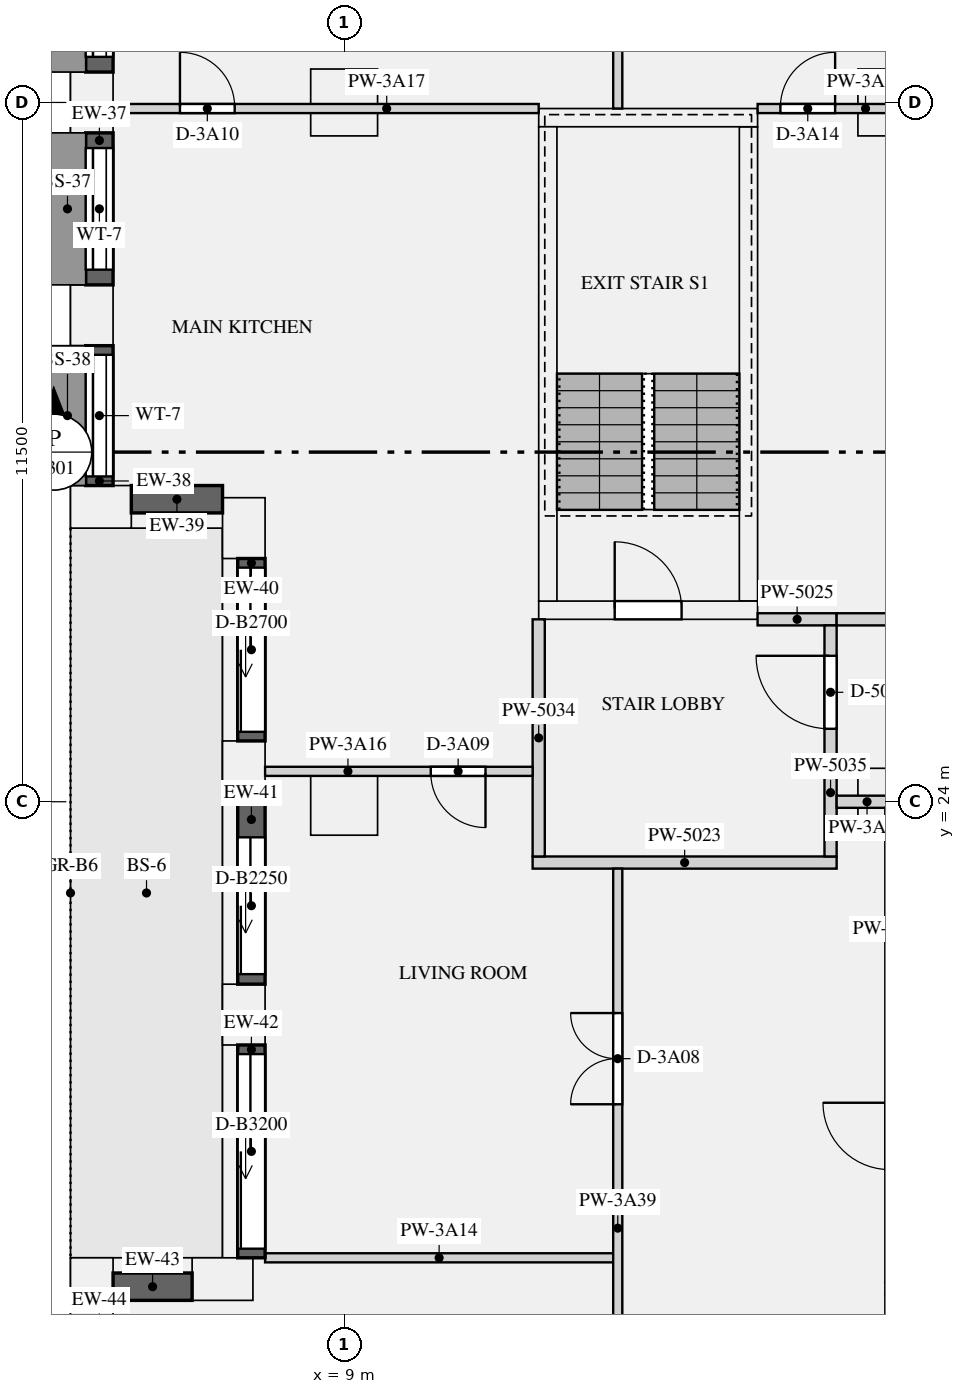
"""IFC4 building model, lengths in metres.
Left out: names, types, materials, properties, quantities, classifications, styles, units other than length and angle.
Written with IfcOpenShell. Run it as: python <this file> out.ifc"""

import sys

from ifc_helpers import new_model, si_unit, direction, frame, frame_2d, origin, origin_2d, place, context, subcontext, project, spatial, rectangle, extrude, element, fill, save


model = new_model("IFC4")
c1 = context("Model", 3, precision=1e-05, world=origin(), true_north=direction((0.0, 1.0)))
c2 = subcontext(c1, "Body", "Model", "MODEL_VIEW")
j1 = project(units=[si_unit("LENGTHUNIT", "METRE"), si_unit("PLANEANGLEUNIT", "RADIAN")], contexts=[c1])
p1 = place(None, origin())
s1 = spatial("IfcSite", under=j1, at=p1, CompositionType="ELEMENT")
p2 = place(p1, origin())
s2 = spatial("IfcBuilding", under=s1, at=p2, CompositionType="ELEMENT")
p3 = place(p2, frame((0.0, 0.0, 144.45)))
s3 = spatial("IfcBuildingStorey", under=s2, at=p3, CompositionType="ELEMENT", Elevation=144.45)
for number, where, z_axis, x_axis in (
    (1, (4.85, 35.5, 0.0), (0.0, 0.0, 1.0), (0.0, -1.0, 0.0)),
    (2, (4.85, 32.0, 0.0), (0.0, 0.0, 1.0), (0.0, -1.0, 0.0)),
    (3, (5.0, 28.85, 0.0), (0.0, 0.0, 1.0), (1.0, 0.0, 0.0)),
    (4, (7.35, 28.5, 0.0), (0.0, 0.0, 1.0), (0.0, -1.0, 0.0)),
    (5, (7.35, 24.5, 0.0), (0.0, 0.0, 1.0), (0.0, -1.0, 0.0)),
    (6, (7.35, 20.5, 0.0), (0.0, 0.0, 1.0), (0.0, -1.0, 0.0)),
    (7, (7.0, 16.15, 0.0), (0.0, 0.0, 1.0), (-1.0, 0.0, 0.0)),
    (8, (4.85, 16.0, 0.0), (0.0, 0.0, 1.0), (0.0, -1.0, 0.0)),
):
    element("IfcColumn", number, at=place(p3, frame(where, z_axis=z_axis, x_axis=x_axis)), inside=s3, PredefinedType="USERDEFINED", context=c2, shape_type="SweptSolid", body=[
        extrude(rectangle(XDim=1.0, YDim=0.7, at=origin_2d()), origin(), (0.0, 0.0, 1.0), 3.15),
    ])
for number, where, z_axis, x_axis in (
    (9, (9.0, 24.0, 0.0), (0.0, 0.0, 1.0), (1.0, 0.0, 0.0)),
    (10, (18.0, 24.0, 0.0), (0.0, 0.0, 1.0), (1.0, 0.0, 0.0)),
    (11, (9.0, 35.5, 0.0), (0.0, 0.0, 1.0), (1.0, 0.0, 0.0)),
    (12, (18.0, 35.5, 0.0), (0.0, 0.0, 1.0), (1.0, 0.0, 0.0)),
):
    element("IfcColumn", number, at=place(p3, frame(where, z_axis=z_axis, x_axis=x_axis)), inside=s3, PredefinedType="COLUMN", context=c2, shape_type="SweptSolid", body=[
        extrude(rectangle(XDim=1.1, YDim=1.1, at=origin_2d()), origin(), (0.0, 0.0, 1.0), 3.15),
    ])
p4 = place(p3, frame((12.2, 27.15, 0.0), z_axis=(0.0, 0.0, 1.0), x_axis=(1.0, 0.0, 0.0)))
e13 = element("IfcWall", 13, at=p4, inside=s3, PredefinedType="SHEAR", context=c2, shape_type="SweptSolid", body=[
    extrude(rectangle(XDim=3.6, YDim=0.3, at=frame_2d((1.8, 0.0))), origin(), (0.0, 0.0, 1.0), 3.15),
])
p5 = place(p4, frame((1.25, 0.0, 0.0)))
e14 = element("IfcOpeningElement", 14, at=p5, cuts=e13, PredefinedType="OPENING", context=c2, shape_type="SweptSolid", body=[
    extrude(rectangle(XDim=1.1, YDim=2.1, at=frame_2d((0.55, 1.05))), frame((0.0, 0.16, 0.0), z_axis=(0.0, -1.0, 0.0), x_axis=(1.0, 0.0, 0.0)), (0.0, 0.0, 1.0), 0.32),
])
p6 = place(p3, frame((12.2, 35.25, 0.0), z_axis=(0.0, 0.0, 1.0), x_axis=(1.0, 0.0, 0.0)))
e15 = element("IfcWall", 15, at=p6, inside=s3, PredefinedType="SHEAR", context=c2, shape_type="SweptSolid", body=[
    extrude(rectangle(XDim=3.6, YDim=0.3, at=frame_2d((1.8, 0.0))), origin(), (0.0, 0.0, 1.0), 3.15),
])
for number, where, z_axis, x_axis in (
    (16, (12.35, 27.3, 0.0), (0.0, 0.0, 1.0), (0.0, 1.0, 0.0)),
    (17, (15.65, 27.3, 0.0), (0.0, 0.0, 1.0), (0.0, 1.0, 0.0)),
):
    element("IfcWall", number, at=place(p3, frame(where, z_axis=z_axis, x_axis=x_axis)), inside=s3, PredefinedType="SHEAR", context=c2, shape_type="SweptSolid", body=[
        extrude(rectangle(XDim=7.8, YDim=0.3, at=frame_2d((3.9, 0.0))), origin(), (0.0, 0.0, 1.0), 3.15),
    ])
p7 = place(p3, frame((4.975, 38.0, 0.9), z_axis=(0.0, 0.0, 1.0), x_axis=(0.0, -1.0, 0.0)))
e18 = element("IfcWall", 18, at=p7, inside=s3, PredefinedType="SOLIDWALL", context=c2, shape_type="SweptSolid", body=[
    extrude(rectangle(XDim=2.0, YDim=0.45, at=frame_2d((1.0, 0.0))), origin(), (0.0, 0.0, 1.0), 1.93),
])
p8 = place(p7, frame((0.25, 0.0, 0.15)))
e19 = element("IfcOpeningElement", 19, at=p8, cuts=e18, PredefinedType="OPENING", context=c2, shape_type="SweptSolid", body=[
    extrude(rectangle(XDim=1.5, YDim=1.5, at=frame_2d((0.75, 0.75))), frame((0.0, 0.235, 0.0), z_axis=(0.0, -1.0, 0.0), x_axis=(1.0, 0.0, 0.0)), (0.0, 0.0, 1.0), 0.47),
])
p9 = place(p3, frame((4.975, 35.0, 0.9), z_axis=(0.0, 0.0, 1.0), x_axis=(0.0, -1.0, 0.0)))
e20 = element("IfcWall", 20, at=p9, inside=s3, PredefinedType="SOLIDWALL", context=c2, shape_type="SweptSolid", body=[
    extrude(rectangle(XDim=2.5, YDim=0.45, at=frame_2d((1.25, 0.0))), origin(), (0.0, 0.0, 1.0), 1.93),
])
p10 = place(p9, frame((0.25, 0.0, 0.15)))
e21 = element("IfcOpeningElement", 21, at=p10, cuts=e20, PredefinedType="OPENING", context=c2, shape_type="SweptSolid", body=[
    extrude(rectangle(XDim=2.0, YDim=1.5, at=frame_2d((1.0, 0.75))), frame((0.0, 0.235, 0.0), z_axis=(0.0, -1.0, 0.0), x_axis=(1.0, 0.0, 0.0)), (0.0, 0.0, 1.0), 0.47),
])
p11 = place(p3, frame((4.975, 31.5, 0.9), z_axis=(0.0, 0.0, 1.0), x_axis=(0.0, -1.0, 0.0)))
e22 = element("IfcWall", 22, at=p11, inside=s3, PredefinedType="SOLIDWALL", context=c2, shape_type="SweptSolid", body=[
    extrude(rectangle(XDim=2.3, YDim=0.45, at=frame_2d((1.15, 0.0))), origin(), (0.0, 0.0, 1.0), 1.93),
])
p12 = place(p11, frame((0.15, 0.0, 0.15)))
e23 = element("IfcOpeningElement", 23, at=p12, cuts=e22, PredefinedType="OPENING", context=c2, shape_type="SweptSolid", body=[
    extrude(rectangle(XDim=2.0, YDim=1.5, at=frame_2d((1.0, 0.75))), frame((0.0, 0.235, 0.0), z_axis=(0.0, -1.0, 0.0), x_axis=(1.0, 0.0, 0.0)), (0.0, 0.0, 1.0), 0.47),
])
p13 = place(p3, frame((5.5, 28.975, 0.9), z_axis=(0.0, 0.0, 1.0), x_axis=(1.0, 0.0, 0.0)))
e24 = element("IfcWall", 24, at=p13, inside=s3, PredefinedType="SOLIDWALL", context=c2, shape_type="SweptSolid", body=[
    extrude(rectangle(XDim=1.5, YDim=0.45, at=frame_2d((0.75, 0.0))), origin(), (0.0, 0.0, 1.0), 1.93),
])
p14 = place(p3, frame((7.475, 28.0, 0.0), z_axis=(0.0, 0.0, 1.0), x_axis=(0.0, -1.0, 0.0)))
e25 = element("IfcWall", 25, at=p14, inside=s3, PredefinedType="SOLIDWALL", context=c2, shape_type="SweptSolid", body=[
    extrude(rectangle(XDim=3.0, YDim=0.45, at=frame_2d((1.5, 0.0))), origin(), (0.0, 0.0, 1.0), 2.83),
])
p15 = place(p14, frame((0.15, 0.0, 0.0)))
e26 = element("IfcOpeningElement", 26, at=p15, cuts=e25, PredefinedType="OPENING", context=c2, shape_type="SweptSolid", body=[
    extrude(rectangle(XDim=2.7, YDim=2.3, at=frame_2d((1.35, 1.15))), frame((0.0, 0.235, 0.0), z_axis=(0.0, -1.0, 0.0), x_axis=(1.0, 0.0, 0.0)), (0.0, 0.0, 1.0), 0.47),
])
p16 = place(p3, frame((7.475, 24.0, 0.0), z_axis=(0.0, 0.0, 1.0), x_axis=(0.0, -1.0, 0.0)))
e27 = element("IfcWall", 27, at=p16, inside=s3, PredefinedType="SOLIDWALL", context=c2, shape_type="SweptSolid", body=[
    extrude(rectangle(XDim=3.0, YDim=0.45, at=frame_2d((1.5, 0.0))), origin(), (0.0, 0.0, 1.0), 2.83),
])
p17 = place(p16, frame((0.585, 0.0, 0.0)))
e28 = element("IfcOpeningElement", 28, at=p17, cuts=e27, PredefinedType="OPENING", context=c2, shape_type="SweptSolid", body=[
    extrude(rectangle(XDim=2.25, YDim=2.3, at=frame_2d((1.125, 1.15))), frame((0.0, 0.235, 0.0), z_axis=(0.0, -1.0, 0.0), x_axis=(1.0, 0.0, 0.0)), (0.0, 0.0, 1.0), 0.47),
])
p18 = place(p3, frame((7.475, 20.0, 0.0), z_axis=(0.0, 0.0, 1.0), x_axis=(0.0, -1.0, 0.0)))
e29 = element("IfcWall", 29, at=p18, inside=s3, PredefinedType="SOLIDWALL", context=c2, shape_type="SweptSolid", body=[
    extrude(rectangle(XDim=3.5, YDim=0.45, at=frame_2d((1.75, 0.0))), origin(), (0.0, 0.0, 1.0), 2.83),
])
p19 = place(p18, frame((0.15, 0.0, 0.0)))
e30 = element("IfcOpeningElement", 30, at=p19, cuts=e29, PredefinedType="OPENING", context=c2, shape_type="SweptSolid", body=[
    extrude(rectangle(XDim=3.2, YDim=2.3, at=frame_2d((1.6, 1.15))), frame((0.0, 0.235, 0.0), z_axis=(0.0, -1.0, 0.0), x_axis=(1.0, 0.0, 0.0)), (0.0, 0.0, 1.0), 0.47),
])
p20 = place(p3, frame((6.5, 16.025, 0.9), z_axis=(0.0, 0.0, 1.0), x_axis=(-1.0, 0.0, 0.0)))
e31 = element("IfcWall", 31, at=p20, inside=s3, PredefinedType="SOLIDWALL", context=c2, shape_type="SweptSolid", body=[
    extrude(rectangle(XDim=1.3, YDim=0.45, at=frame_2d((0.65, 0.0))), origin(), (0.0, 0.0, 1.0), 1.93),
])
p21 = place(p3, frame((12.1, 23.0, 0.0), z_axis=(0.0, 0.0, 1.0), x_axis=(1.0, 0.0, 0.0)))
e32 = element("IfcWall", 32, at=p21, inside=s3, PredefinedType="PARTITIONING", context=c2, shape_type="SweptSolid", body=[
    extrude(rectangle(XDim=5.0, YDim=0.2, at=frame_2d((2.5, 0.0))), origin(), (0.0, 0.0, 1.0), 2.83),
])
p22 = place(p3, frame((15.8, 27.0, 0.0), z_axis=(0.0, 0.0, 1.0), x_axis=(1.0, 0.0, 0.0)))
e33 = element("IfcWall", 33, at=p22, inside=s3, PredefinedType="PARTITIONING", context=c2, shape_type="SweptSolid", body=[
    extrude(rectangle(XDim=1.3, YDim=0.2, at=frame_2d((0.65, 0.0))), origin(), (0.0, 0.0, 1.0), 2.83),
])
p23 = place(p3, frame((12.2, 23.1, 0.0), z_axis=(0.0, 0.0, 1.0), x_axis=(0.0, 1.0, 0.0)))
e34 = element("IfcWall", 34, at=p23, inside=s3, PredefinedType="PARTITIONING", context=c2, shape_type="SweptSolid", body=[
    extrude(rectangle(XDim=3.9, YDim=0.2, at=frame_2d((1.95, 0.0))), origin(), (0.0, 0.0, 1.0), 2.83),
])
p24 = place(p3, frame((17.0, 23.1, 0.0), z_axis=(0.0, 0.0, 1.0), x_axis=(0.0, 1.0, 0.0)))
e35 = element("IfcWall", 35, at=p24, inside=s3, PredefinedType="PARTITIONING", context=c2, shape_type="SweptSolid", body=[
    extrude(rectangle(XDim=3.8, YDim=0.2, at=frame_2d((1.9, 0.0))), origin(), (0.0, 0.0, 1.0), 2.83),
])
p25 = place(p24, frame((2.1, 0.0, 0.0)))
e36 = element("IfcOpeningElement", 36, at=p25, cuts=e35, PredefinedType="OPENING", context=c2, shape_type="SweptSolid", body=[
    extrude(rectangle(XDim=1.2, YDim=2.1, at=frame_2d((0.6, 1.05))), frame((0.0, 0.11, 0.0), z_axis=(0.0, -1.0, 0.0), x_axis=(1.0, 0.0, 0.0)), (0.0, 0.0, 1.0), 0.22),
])
p26 = place(p3, frame((17.1, 24.0, 0.0), z_axis=(0.0, 0.0, 1.0), x_axis=(1.0, 0.0, 0.0)))
e37 = element("IfcWall", 37, at=p26, inside=s3, PredefinedType="PARTITIONING", context=c2, shape_type="SweptSolid", body=[
    extrude(rectangle(XDim=1.0, YDim=0.2, at=frame_2d((0.5, 0.0))), origin(), (0.0, 0.0, 1.0), 2.83),
])
p27 = place(p3, frame((17.1, 27.0, 0.0), z_axis=(0.0, 0.0, 1.0), x_axis=(1.0, 0.0, 0.0)))
e38 = element("IfcWall", 38, at=p27, inside=s3, PredefinedType="PARTITIONING", context=c2, shape_type="SweptSolid", body=[
    extrude(rectangle(XDim=7.0, YDim=0.2, at=frame_2d((3.5, 0.0))), origin(), (0.0, 0.0, 1.0), 2.83),
])
p28 = place(p3, frame((7.7, 16.5, 0.0), z_axis=(0.0, 0.0, 1.0), x_axis=(1.0, 0.0, 0.0)))
e39 = element("IfcWall", 39, at=p28, inside=s3, PredefinedType="PARTITIONING", context=c2, shape_type="SweptSolid", body=[
    extrude(rectangle(XDim=5.725, YDim=0.15, at=frame_2d((2.863, 0.0))), origin(), (0.0, 0.0, 1.0), 2.83),
])
p29 = place(p3, frame((7.7, 24.5, 0.0), z_axis=(0.0, 0.0, 1.0), x_axis=(1.0, 0.0, 0.0)))
e40 = element("IfcWall", 40, at=p29, inside=s3, PredefinedType="PARTITIONING", context=c2, shape_type="SweptSolid", body=[
    extrude(rectangle(XDim=4.4, YDim=0.15, at=frame_2d((2.2, 0.0))), origin(), (0.0, 0.0, 1.0), 2.83),
])
p30 = place(p29, frame((2.725, 0.0, 0.0)))
e41 = element("IfcOpeningElement", 41, at=p30, cuts=e40, PredefinedType="OPENING", context=c2, shape_type="SweptSolid", body=[
    extrude(rectangle(XDim=0.9, YDim=2.1, at=frame_2d((0.45, 1.05))), frame((0.0, 0.085, 0.0), z_axis=(0.0, -1.0, 0.0), x_axis=(1.0, 0.0, 0.0)), (0.0, 0.0, 1.0), 0.17),
])
p31 = place(p3, frame((5.2, 35.4, 0.0), z_axis=(0.0, 0.0, 1.0), x_axis=(1.0, 0.0, 0.0)))
e42 = element("IfcWall", 42, at=p31, inside=s3, PredefinedType="PARTITIONING", context=c2, shape_type="SweptSolid", body=[
    extrude(rectangle(XDim=7.0, YDim=0.15, at=frame_2d((3.5, 0.0))), origin(), (0.0, 0.0, 1.0), 2.83),
])
p32 = place(p31, frame((1.1, 0.0, 0.0)))
e43 = element("IfcOpeningElement", 43, at=p32, cuts=e42, PredefinedType="OPENING", context=c2, shape_type="SweptSolid", body=[
    extrude(rectangle(XDim=0.9, YDim=2.1, at=frame_2d((0.45, 1.05))), frame((0.0, 0.085, 0.0), z_axis=(0.0, -1.0, 0.0), x_axis=(1.0, 0.0, 0.0)), (0.0, 0.0, 1.0), 0.17),
])
p33 = place(p3, frame((15.8, 35.4, 0.0), z_axis=(0.0, 0.0, 1.0), x_axis=(1.0, 0.0, 0.0)))
e44 = element("IfcWall", 44, at=p33, inside=s3, PredefinedType="PARTITIONING", context=c2, shape_type="SweptSolid", body=[
    extrude(rectangle(XDim=2.275, YDim=0.15, at=frame_2d((1.137, 0.0))), origin(), (0.0, 0.0, 1.0), 2.83),
])
p34 = place(p33, frame((0.375, 0.0, 0.0)))
e45 = element("IfcOpeningElement", 45, at=p34, cuts=e44, PredefinedType="OPENING", context=c2, shape_type="SweptSolid", body=[
    extrude(rectangle(XDim=0.9, YDim=2.1, at=frame_2d((0.45, 1.05))), frame((0.0, 0.085, 0.0), z_axis=(0.0, -1.0, 0.0), x_axis=(1.0, 0.0, 0.0)), (0.0, 0.0, 1.0), 0.17),
])
p35 = place(p3, frame((13.5, 10.575, 0.0), z_axis=(0.0, 0.0, 1.0), x_axis=(0.0, 1.0, 0.0)))
e46 = element("IfcWall", 46, at=p35, inside=s3, PredefinedType="PARTITIONING", context=c2, shape_type="SweptSolid", body=[
    extrude(rectangle(XDim=12.325, YDim=0.15, at=frame_2d((6.163, 0.0))), origin(), (0.0, 0.0, 1.0), 2.83),
])
p36 = place(p35, frame((3.475, 0.0, 0.0)))
e47 = element("IfcOpeningElement", 47, at=p36, cuts=e46, PredefinedType="OPENING", context=c2, shape_type="SweptSolid", body=[
    extrude(rectangle(XDim=0.9, YDim=2.1, at=frame_2d((0.45, 1.05))), frame((0.0, 0.085, 0.0), z_axis=(0.0, -1.0, 0.0), x_axis=(1.0, 0.0, 0.0)), (0.0, 0.0, 1.0), 0.17),
])
p37 = place(p35, frame((8.45, 0.0, 0.0)))
e48 = element("IfcOpeningElement", 48, at=p37, cuts=e46, PredefinedType="OPENING", context=c2, shape_type="SweptSolid", body=[
    extrude(rectangle(XDim=1.5, YDim=2.1, at=frame_2d((0.75, 1.05))), frame((0.0, 0.085, 0.0), z_axis=(0.0, -1.0, 0.0), x_axis=(1.0, 0.0, 0.0)), (0.0, 0.0, 1.0), 0.17),
])
p38 = place(p3, frame((13.5, 35.4, 0.0), z_axis=(0.0, 0.0, 1.0), x_axis=(0.0, 1.0, 0.0)))
e49 = element("IfcWall", 49, at=p38, inside=s3, PredefinedType="PARTITIONING", context=c2, shape_type="SweptSolid", body=[
    extrude(rectangle(XDim=7.4, YDim=0.15, at=frame_2d((3.7, 0.0))), origin(), (0.0, 0.0, 1.0), 2.83),
])
p39 = place(p38, frame((3.025, 0.0, 0.0)))
e50 = element("IfcOpeningElement", 50, at=p39, cuts=e49, PredefinedType="OPENING", context=c2, shape_type="SweptSolid", body=[
    extrude(rectangle(XDim=1.5, YDim=2.1, at=frame_2d((0.75, 1.05))), frame((0.0, 0.085, 0.0), z_axis=(0.0, -1.0, 0.0), x_axis=(1.0, 0.0, 0.0)), (0.0, 0.0, 1.0), 0.17),
])
p40 = place(p8, origin())
e51 = element("IfcWindow", 51, at=p40, inside=s3, PartitioningType="SINGLE_PANEL", PredefinedType="WINDOW", context=c2, shape_type="SweptSolid", body=[
    extrude(rectangle(XDim=1.5, YDim=1.5, at=frame_2d((0.75, 0.75))), frame((0.0, -0.065, 0.0), z_axis=(0.0, -1.0, 0.0), x_axis=(1.0, 0.0, 0.0)), (0.0, 0.0, 1.0), 0.06),
])
fill(e19, e51)
p41 = place(p10, origin())
e52 = element("IfcWindow", 52, at=p41, inside=s3, PartitioningType="SINGLE_PANEL", PredefinedType="WINDOW", context=c2, shape_type="SweptSolid", body=[
    extrude(rectangle(XDim=2.0, YDim=1.5, at=frame_2d((1.0, 0.75))), frame((0.0, -0.065, 0.0), z_axis=(0.0, -1.0, 0.0), x_axis=(1.0, 0.0, 0.0)), (0.0, 0.0, 1.0), 0.06),
])
fill(e21, e52)
p42 = place(p12, origin())
e53 = element("IfcWindow", 53, at=p42, inside=s3, PartitioningType="SINGLE_PANEL", PredefinedType="WINDOW", context=c2, shape_type="SweptSolid", body=[
    extrude(rectangle(XDim=2.0, YDim=1.5, at=frame_2d((1.0, 0.75))), frame((0.0, -0.065, 0.0), z_axis=(0.0, -1.0, 0.0), x_axis=(1.0, 0.0, 0.0)), (0.0, 0.0, 1.0), 0.06),
])
fill(e23, e53)
p43 = place(p15, origin())
e54 = element("IfcDoor", 54, at=p43, inside=s3, OperationType="SLIDING_TO_LEFT", PredefinedType="DOOR", context=c2, shape_type="SweptSolid", body=[
    extrude(rectangle(XDim=2.7, YDim=2.3, at=frame_2d((1.35, 1.15))), frame((0.0, -0.07, 0.0), z_axis=(0.0, -1.0, 0.0), x_axis=(1.0, 0.0, 0.0)), (0.0, 0.0, 1.0), 0.05),
])
fill(e26, e54)
p44 = place(p17, origin())
e55 = element("IfcDoor", 55, at=p44, inside=s3, OperationType="SLIDING_TO_LEFT", PredefinedType="DOOR", context=c2, shape_type="SweptSolid", body=[
    extrude(rectangle(XDim=2.25, YDim=2.3, at=frame_2d((1.125, 1.15))), frame((0.0, -0.07, 0.0), z_axis=(0.0, -1.0, 0.0), x_axis=(1.0, 0.0, 0.0)), (0.0, 0.0, 1.0), 0.05),
])
fill(e28, e55)
p45 = place(p19, origin())
e56 = element("IfcDoor", 56, at=p45, inside=s3, OperationType="SLIDING_TO_LEFT", PredefinedType="DOOR", context=c2, shape_type="SweptSolid", body=[
    extrude(rectangle(XDim=3.2, YDim=2.3, at=frame_2d((1.6, 1.15))), frame((0.0, -0.07, 0.0), z_axis=(0.0, -1.0, 0.0), x_axis=(1.0, 0.0, 0.0)), (0.0, 0.0, 1.0), 0.05),
])
fill(e30, e56)
p46 = place(p5, origin())
e57 = element("IfcDoor", 57, at=p46, inside=s3, OperationType="SINGLE_SWING_LEFT", PredefinedType="DOOR", context=c2, shape_type="SweptSolid", body=[
    extrude(rectangle(XDim=1.1, YDim=2.1, at=frame_2d((0.55, 1.05))), frame((0.0, 0.025, 0.0), z_axis=(0.0, -1.0, 0.0), x_axis=(1.0, 0.0, 0.0)), (0.0, 0.0, 1.0), 0.05),
])
fill(e14, e57)
p47 = place(p25, origin())
e58 = element("IfcDoor", 58, at=p47, inside=s3, OperationType="SINGLE_SWING_RIGHT", PredefinedType="DOOR", context=c2, shape_type="SweptSolid", body=[
    extrude(rectangle(XDim=1.2, YDim=2.1, at=frame_2d((0.6, 1.05))), frame((0.0, 0.025, 0.0), z_axis=(0.0, -1.0, 0.0), x_axis=(1.0, 0.0, 0.0)), (0.0, 0.0, 1.0), 0.05),
])
fill(e36, e58)
p48 = place(p37, origin())
e59 = element("IfcDoor", 59, at=p48, inside=s3, OperationType="DOUBLE_DOOR_SINGLE_SWING", PredefinedType="DOOR", context=c2, shape_type="SweptSolid", body=[
    extrude(rectangle(XDim=1.5, YDim=2.1, at=frame_2d((0.75, 1.05))), frame((0.0, 0.025, 0.0), z_axis=(0.0, -1.0, 0.0), x_axis=(1.0, 0.0, 0.0)), (0.0, 0.0, 1.0), 0.05),
])
fill(e48, e59)
p49 = place(p30, frame((0.9, 0.0, 0.0), z_axis=(0.0, 0.0, 1.0), x_axis=(-1.0, 0.0, 0.0)))
e60 = element("IfcDoor", 60, at=p49, inside=s3, OperationType="SINGLE_SWING_LEFT", PredefinedType="DOOR", context=c2, shape_type="SweptSolid", body=[
    extrude(rectangle(XDim=0.9, YDim=2.1, at=frame_2d((0.45, 1.05))), frame((0.0, 0.025, 0.0), z_axis=(0.0, -1.0, 0.0), x_axis=(1.0, 0.0, 0.0)), (0.0, 0.0, 1.0), 0.05),
])
fill(e41, e60)
p50 = place(p32, origin())
e61 = element("IfcDoor", 61, at=p50, inside=s3, OperationType="SINGLE_SWING_LEFT", PredefinedType="DOOR", context=c2, shape_type="SweptSolid", body=[
    extrude(rectangle(XDim=0.9, YDim=2.1, at=frame_2d((0.45, 1.05))), frame((0.0, 0.025, 0.0), z_axis=(0.0, -1.0, 0.0), x_axis=(1.0, 0.0, 0.0)), (0.0, 0.0, 1.0), 0.05),
])
fill(e43, e61)
p51 = place(p34, origin())
e62 = element("IfcDoor", 62, at=p51, inside=s3, OperationType="SINGLE_SWING_RIGHT", PredefinedType="DOOR", context=c2, shape_type="SweptSolid", body=[
    extrude(rectangle(XDim=0.9, YDim=2.1, at=frame_2d((0.45, 1.05))), frame((0.0, 0.025, 0.0), z_axis=(0.0, -1.0, 0.0), x_axis=(1.0, 0.0, 0.0)), (0.0, 0.0, 1.0), 0.05),
])
fill(e45, e62)
save(model, sys.argv[1])
